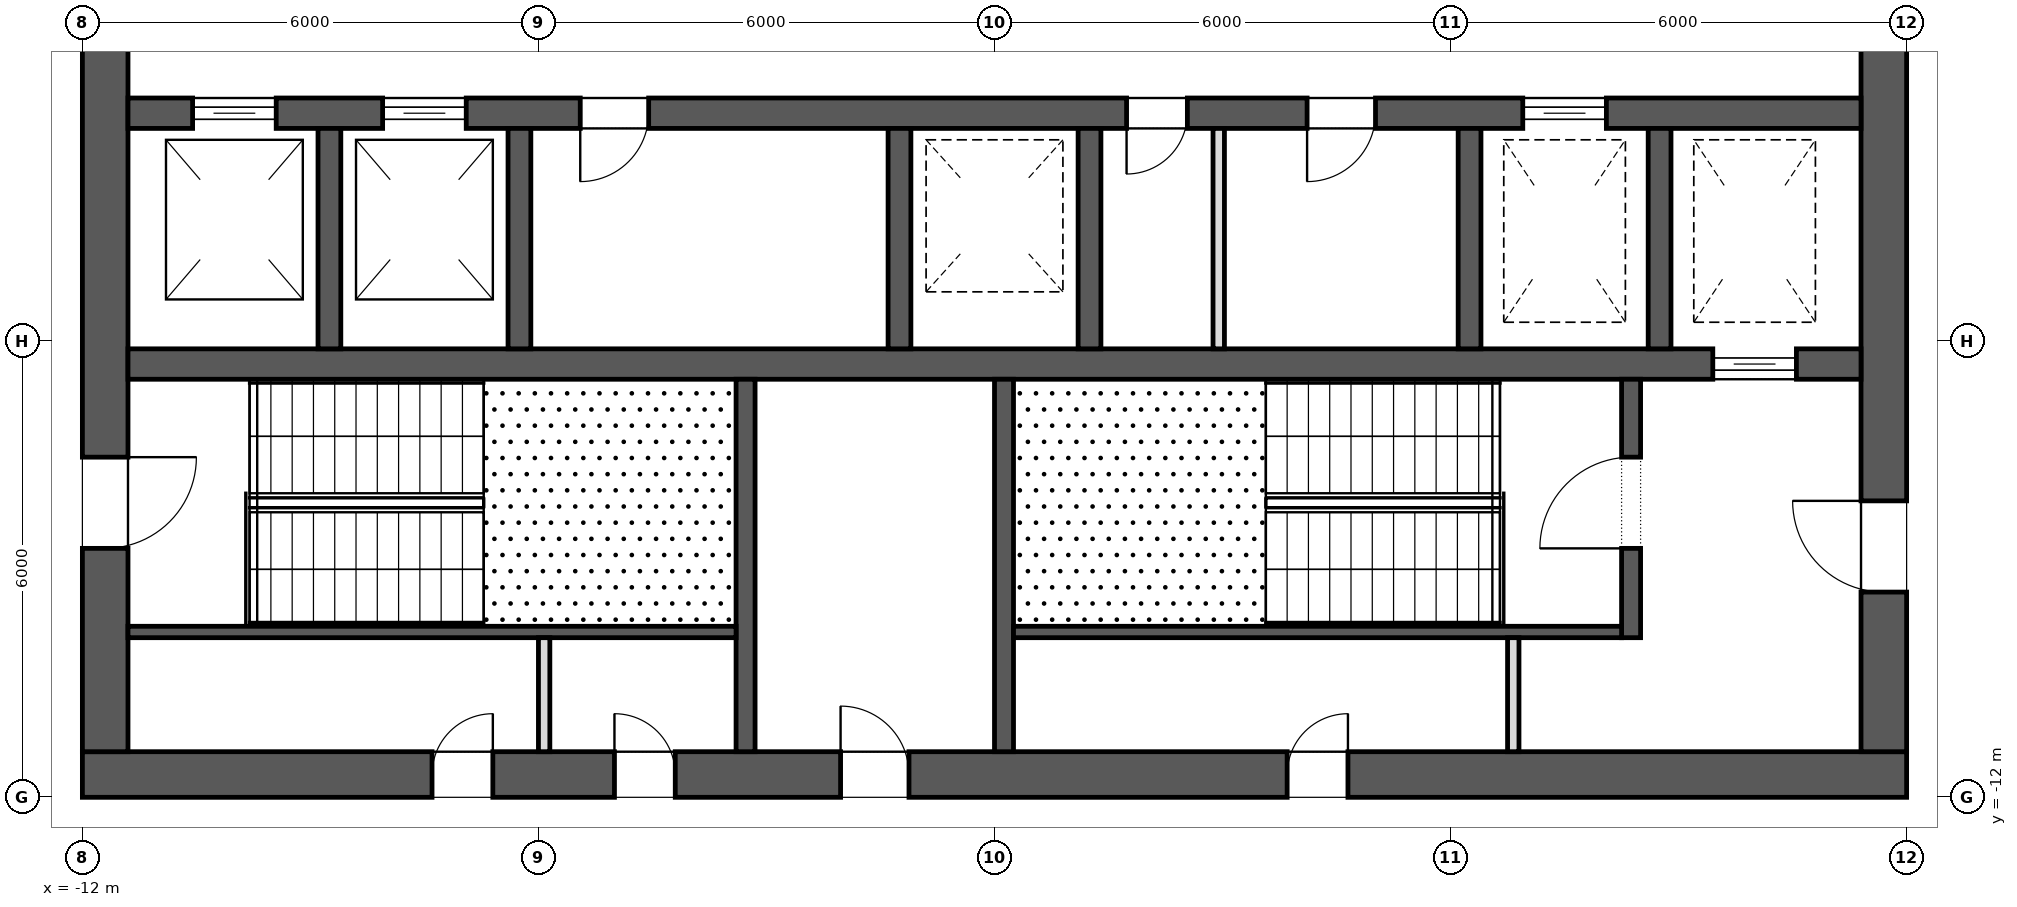
"""IFC4 building model, lengths in metres.
Left out: names, types, materials, properties, quantities, classifications, styles, units other than length and angle.
Written with IfcOpenShell. Run it as: python <this file> out.ifc"""

import sys

from ifc_helpers import new_model, si_unit, direction, frame, frame_2d, origin, place, context, subcontext, project, spatial, rectangle, extrude, element, fill, save


model = new_model("IFC4")
c1 = context("Model", 3, precision=1e-05, world=origin(), true_north=direction((0.0, 1.0)))
c2 = subcontext(c1, "Body", "Model", "MODEL_VIEW")
j1 = project(units=[si_unit("LENGTHUNIT", "METRE"), si_unit("PLANEANGLEUNIT", "RADIAN")], contexts=[c1])
p1 = place(None, origin())
s1 = spatial("IfcSite", under=j1, at=p1, CompositionType="ELEMENT")
p2 = place(p1, origin())
s2 = spatial("IfcBuilding", under=s1, at=p2, CompositionType="ELEMENT")
p3 = place(p2, frame((0.0, 0.0, 268.3)))
s3 = spatial("IfcBuildingStorey", under=s2, at=p3, CompositionType="ELEMENT", Elevation=268.3)
p4 = place(p3, frame((-12.0, -11.7, 0.0), z_axis=(0.0, 0.0, 1.0), x_axis=(1.0, 0.0, 0.0)))
e1 = element("IfcWall", 1, at=p4, inside=s3, PredefinedType="SHEAR", context=c2, shape_type="SweptSolid", body=[
    extrude(rectangle(XDim=24.0, YDim=0.6, at=frame_2d((12.0, 0.0))), origin(), (0.0, 0.0, 1.0), 4.0),
])
p5 = place(p4, frame((9.975, 0.0, 0.0)))
e2 = element("IfcOpeningElement", 2, at=p5, cuts=e1, PredefinedType="OPENING", context=c2, shape_type="SweptSolid", body=[
    extrude(rectangle(XDim=0.9, YDim=2.1, at=frame_2d((0.45, 1.05))), frame((0.0, 0.312, 0.0), z_axis=(0.0, -1.0, 0.0), x_axis=(1.0, 0.0, 0.0)), (0.0, 0.0, 1.0), 0.624),
])
p6 = place(p4, frame((4.6, 0.0, 0.0)))
e3 = element("IfcOpeningElement", 3, at=p6, cuts=e1, PredefinedType="OPENING", context=c2, shape_type="SweptSolid", body=[
    extrude(rectangle(XDim=0.8, YDim=2.1, at=frame_2d((0.4, 1.05))), frame((0.0, 0.312, 0.0), z_axis=(0.0, -1.0, 0.0), x_axis=(1.0, 0.0, 0.0)), (0.0, 0.0, 1.0), 0.624),
])
p7 = place(p4, frame((7.0, 0.0, 0.0)))
e4 = element("IfcOpeningElement", 4, at=p7, cuts=e1, PredefinedType="OPENING", context=c2, shape_type="SweptSolid", body=[
    extrude(rectangle(XDim=0.8, YDim=2.1, at=frame_2d((0.4, 1.05))), frame((0.0, 0.312, 0.0), z_axis=(0.0, -1.0, 0.0), x_axis=(1.0, 0.0, 0.0)), (0.0, 0.0, 1.0), 0.624),
])
p8 = place(p4, frame((15.85, 0.0, 0.0)))
e5 = element("IfcOpeningElement", 5, at=p8, cuts=e1, PredefinedType="OPENING", context=c2, shape_type="SweptSolid", body=[
    extrude(rectangle(XDim=0.8, YDim=2.1, at=frame_2d((0.4, 1.05))), frame((0.0, 0.312, 0.0), z_axis=(0.0, -1.0, 0.0), x_axis=(1.0, 0.0, 0.0)), (0.0, 0.0, 1.0), 0.624),
])
p9 = place(p3, frame((11.7, -11.4, 0.0), z_axis=(0.0, 0.0, 1.0), x_axis=(0.0, 1.0, 0.0)))
e6 = element("IfcWall", 6, at=p9, inside=s3, PredefinedType="SHEAR", context=c2, shape_type="SweptSolid", body=[
    extrude(rectangle(XDim=22.8, YDim=0.6, at=frame_2d((11.4, 0.0))), origin(), (0.0, 0.0, 1.0), 4.0),
])
p10 = place(p9, frame((10.2, 0.0, 0.0)))
e7 = element("IfcOpeningElement", 7, at=p10, cuts=e6, PredefinedType="OPENING", context=c2, shape_type="SweptSolid", body=[
    extrude(rectangle(XDim=2.4, YDim=2.1, at=frame_2d((1.2, 1.05))), frame((0.0, 0.312, 0.0), z_axis=(0.0, -1.0, 0.0), x_axis=(1.0, 0.0, 0.0)), (0.0, 0.0, 1.0), 0.624),
])
p11 = place(p9, frame((19.5, 0.0, 0.0)))
e8 = element("IfcOpeningElement", 8, at=p11, cuts=e6, PredefinedType="OPENING", context=c2, shape_type="SweptSolid", body=[
    extrude(rectangle(XDim=1.2, YDim=2.1, at=frame_2d((0.6, 1.05))), frame((0.0, 0.312, 0.0), z_axis=(0.0, -1.0, 0.0), x_axis=(1.0, 0.0, 0.0)), (0.0, 0.0, 1.0), 0.624),
])
p12 = place(p9, frame((2.1, 0.0, 0.0)))
e9 = element("IfcOpeningElement", 9, at=p12, cuts=e6, PredefinedType="OPENING", context=c2, shape_type="SweptSolid", body=[
    extrude(rectangle(XDim=1.2, YDim=2.1, at=frame_2d((0.6, 1.05))), frame((0.0, 0.312, 0.0), z_axis=(0.0, -1.0, 0.0), x_axis=(1.0, 0.0, 0.0)), (0.0, 0.0, 1.0), 0.624),
])
p13 = place(p3, frame((-11.7, -11.4, 0.0), z_axis=(0.0, 0.0, 1.0), x_axis=(0.0, 1.0, 0.0)))
e10 = element("IfcWall", 10, at=p13, inside=s3, PredefinedType="SHEAR", context=c2, shape_type="SweptSolid", body=[
    extrude(rectangle(XDim=22.8, YDim=0.6, at=frame_2d((11.4, 0.0))), origin(), (0.0, 0.0, 1.0), 4.0),
])
p14 = place(p13, frame((10.2, 0.0, 0.0)))
e11 = element("IfcOpeningElement", 11, at=p14, cuts=e10, PredefinedType="OPENING", context=c2, shape_type="SweptSolid", body=[
    extrude(rectangle(XDim=2.4, YDim=2.1, at=frame_2d((1.2, 1.05))), frame((0.0, 0.312, 0.0), z_axis=(0.0, -1.0, 0.0), x_axis=(1.0, 0.0, 0.0)), (0.0, 0.0, 1.0), 0.624),
])
p15 = place(p13, frame((18.925, 0.0, 0.0)))
e12 = element("IfcOpeningElement", 12, at=p15, cuts=e10, PredefinedType="OPENING", context=c2, shape_type="SweptSolid", body=[
    extrude(rectangle(XDim=1.2, YDim=2.1, at=frame_2d((0.6, 1.05))), frame((0.0, 0.312, 0.0), z_axis=(0.0, -1.0, 0.0), x_axis=(1.0, 0.0, 0.0)), (0.0, 0.0, 1.0), 0.624),
])
p16 = place(p13, frame((2.675, 0.0, 0.0)))
e13 = element("IfcOpeningElement", 13, at=p16, cuts=e10, PredefinedType="OPENING", context=c2, shape_type="SweptSolid", body=[
    extrude(rectangle(XDim=1.2, YDim=2.1, at=frame_2d((0.6, 1.05))), frame((0.0, 0.312, 0.0), z_axis=(0.0, -1.0, 0.0), x_axis=(1.0, 0.0, 0.0)), (0.0, 0.0, 1.0), 0.624),
])
p17 = place(p3, frame((-11.4, -3.0, 0.0), z_axis=(0.0, 0.0, 1.0), x_axis=(1.0, 0.0, 0.0)))
e14 = element("IfcWall", 14, at=p17, inside=s3, PredefinedType="SHEAR", context=c2, shape_type="SweptSolid", body=[
    extrude(rectangle(XDim=22.8, YDim=0.4, at=frame_2d((11.4, 0.0))), origin(), (0.0, 0.0, 1.0), 4.0),
])
p18 = place(p17, frame((0.85, 0.0, 0.0)))
e15 = element("IfcOpeningElement", 15, at=p18, cuts=e14, PredefinedType="OPENING", context=c2, shape_type="SweptSolid", body=[
    extrude(rectangle(XDim=1.1, YDim=2.1, at=frame_2d((0.55, 1.05))), frame((0.0, 0.212, 0.0), z_axis=(0.0, -1.0, 0.0), x_axis=(1.0, 0.0, 0.0)), (0.0, 0.0, 1.0), 0.424),
])
p19 = place(p17, frame((3.35, 0.0, 0.0)))
e16 = element("IfcOpeningElement", 16, at=p19, cuts=e14, PredefinedType="OPENING", context=c2, shape_type="SweptSolid", body=[
    extrude(rectangle(XDim=1.1, YDim=2.1, at=frame_2d((0.55, 1.05))), frame((0.0, 0.212, 0.0), z_axis=(0.0, -1.0, 0.0), x_axis=(1.0, 0.0, 0.0)), (0.0, 0.0, 1.0), 0.424),
])
p20 = place(p17, frame((18.35, 0.0, 0.0)))
e17 = element("IfcOpeningElement", 17, at=p20, cuts=e14, PredefinedType="OPENING", context=c2, shape_type="SweptSolid", body=[
    extrude(rectangle(XDim=1.1, YDim=2.1, at=frame_2d((0.55, 1.05))), frame((0.0, 0.212, 0.0), z_axis=(0.0, -1.0, 0.0), x_axis=(1.0, 0.0, 0.0)), (0.0, 0.0, 1.0), 0.424),
])
p21 = place(p17, frame((13.137, 0.0, 0.0)))
e18 = element("IfcOpeningElement", 18, at=p21, cuts=e14, PredefinedType="OPENING", context=c2, shape_type="SweptSolid", body=[
    extrude(rectangle(XDim=0.8, YDim=2.1, at=frame_2d((0.4, 1.05))), frame((0.0, 0.212, 0.0), z_axis=(0.0, -1.0, 0.0), x_axis=(1.0, 0.0, 0.0)), (0.0, 0.0, 1.0), 0.424),
])
p22 = place(p17, frame((15.512, 0.0, 0.0)))
e19 = element("IfcOpeningElement", 19, at=p22, cuts=e14, PredefinedType="OPENING", context=c2, shape_type="SweptSolid", body=[
    extrude(rectangle(XDim=0.9, YDim=2.1, at=frame_2d((0.45, 1.05))), frame((0.0, 0.212, 0.0), z_axis=(0.0, -1.0, 0.0), x_axis=(1.0, 0.0, 0.0)), (0.0, 0.0, 1.0), 0.424),
])
p23 = place(p17, frame((5.95, 0.0, 0.0)))
e20 = element("IfcOpeningElement", 20, at=p23, cuts=e14, PredefinedType="OPENING", context=c2, shape_type="SweptSolid", body=[
    extrude(rectangle(XDim=0.9, YDim=2.1, at=frame_2d((0.45, 1.05))), frame((0.0, 0.212, 0.0), z_axis=(0.0, -1.0, 0.0), x_axis=(1.0, 0.0, 0.0)), (0.0, 0.0, 1.0), 0.424),
])
p24 = place(p3, frame((-11.4, -6.3, 0.0), z_axis=(0.0, 0.0, 1.0), x_axis=(1.0, 0.0, 0.0)))
e21 = element("IfcWall", 21, at=p24, inside=s3, PredefinedType="SHEAR", context=c2, shape_type="SweptSolid", body=[
    extrude(rectangle(XDim=22.8, YDim=0.4, at=frame_2d((11.4, 0.0))), origin(), (0.0, 0.0, 1.0), 4.0),
])
p25 = place(p24, frame((20.85, 0.0, 0.0)))
e22 = element("IfcOpeningElement", 22, at=p25, cuts=e21, PredefinedType="OPENING", context=c2, shape_type="SweptSolid", body=[
    extrude(rectangle(XDim=1.1, YDim=2.1, at=frame_2d((0.55, 1.05))), frame((0.0, 0.212, 0.0), z_axis=(0.0, -1.0, 0.0), x_axis=(1.0, 0.0, 0.0)), (0.0, 0.0, 1.0), 0.424),
])
for number, where, z_axis, x_axis in (
    (23, (-8.75, -6.1, 0.0), (0.0, 0.0, 1.0), (0.0, 1.0, 0.0)),
    (24, (-6.25, -6.1, 0.0), (0.0, 0.0, 1.0), (0.0, 1.0, 0.0)),
    (25, (-1.25, -6.1, 0.0), (0.0, 0.0, 1.0), (0.0, 1.0, 0.0)),
    (26, (1.25, -6.1, 0.0), (0.0, 0.0, 1.0), (0.0, 1.0, 0.0)),
    (27, (6.25, -6.1, 0.0), (0.0, 0.0, 1.0), (0.0, 1.0, 0.0)),
    (28, (8.75, -6.1, 0.0), (0.0, 0.0, 1.0), (0.0, 1.0, 0.0)),
):
    element("IfcWall", number, at=place(p3, frame(where, z_axis=z_axis, x_axis=x_axis)), inside=s3, PredefinedType="SHEAR", context=c2, shape_type="SweptSolid", body=[
        extrude(rectangle(XDim=2.9, YDim=0.3, at=frame_2d((1.45, 0.0))), origin(), (0.0, 0.0, 1.0), 4.0),
    ])
for number, where, z_axis, x_axis in (
    (29, (-3.275, -11.4, 0.0), (0.0, 0.0, 1.0), (0.0, 1.0, 0.0)),
    (30, (0.125, -11.4, 0.0), (0.0, 0.0, 1.0), (0.0, 1.0, 0.0)),
):
    element("IfcWall", number, at=place(p3, frame(where, z_axis=z_axis, x_axis=x_axis)), inside=s3, PredefinedType="SHEAR", context=c2, shape_type="SweptSolid", body=[
        extrude(rectangle(XDim=4.9, YDim=0.25, at=frame_2d((2.45, 0.0))), origin(), (0.0, 0.0, 1.0), 3.7),
    ])
p26 = place(p3, frame((8.375, -9.9, 0.0), z_axis=(0.0, 0.0, 1.0), x_axis=(0.0, 1.0, 0.0)))
e31 = element("IfcWall", 31, at=p26, inside=s3, PredefinedType="SHEAR", context=c2, shape_type="SweptSolid", body=[
    extrude(rectangle(XDim=3.4, YDim=0.25, at=frame_2d((1.7, 0.0))), origin(), (0.0, 0.0, 1.0), 3.7),
])
p27 = place(p26, frame((1.175, 0.0, 0.0)))
e32 = element("IfcOpeningElement", 32, at=p27, cuts=e31, PredefinedType="OPENING", context=c2, shape_type="SweptSolid", body=[
    extrude(rectangle(XDim=1.2, YDim=2.1, at=frame_2d((0.6, 1.05))), frame((0.0, 0.137, 0.0), z_axis=(0.0, -1.0, 0.0), x_axis=(1.0, 0.0, 0.0)), (0.0, 0.0, 1.0), 0.274),
])
for number, where, z_axis, x_axis in (
    (33, (-11.4, -9.825, 0.0), (0.0, 0.0, 1.0), (1.0, 0.0, 0.0)),
    (34, (0.25, -9.825, 0.0), (0.0, 0.0, 1.0), (1.0, 0.0, 0.0)),
):
    element("IfcWall", number, at=place(p3, frame(where, z_axis=z_axis, x_axis=x_axis)), inside=s3, PredefinedType="SHEAR", context=c2, shape_type="SweptSolid", body=[
        extrude(rectangle(XDim=8.0, YDim=0.15, at=frame_2d((4.0, 0.0))), origin(), (0.0, 0.0, 1.0), 3.7),
    ])
for number, where, z_axis, x_axis in (
    (35, (-5.925, -11.4, 0.0), (0.0, 0.0, 1.0), (0.0, 1.0, 0.0)),
    (36, (6.825, -11.4, 0.0), (0.0, 0.0, 1.0), (0.0, 1.0, 0.0)),
):
    element("IfcWall", number, at=place(p3, frame(where, z_axis=z_axis, x_axis=x_axis)), inside=s3, PredefinedType="PARTITIONING", context=c2, shape_type="SweptSolid", body=[
        extrude(rectangle(XDim=1.5, YDim=0.15, at=frame_2d((0.75, 0.0))), origin(), (0.0, 0.0, 1.0), 3.7),
    ])
p28 = place(p3, frame((2.95, -6.1, 0.0), z_axis=(0.0, 0.0, 1.0), x_axis=(0.0, 1.0, 0.0)))
e37 = element("IfcWall", 37, at=p28, inside=s3, PredefinedType="PARTITIONING", context=c2, shape_type="SweptSolid", body=[
    extrude(rectangle(XDim=2.9, YDim=0.15, at=frame_2d((1.45, 0.0))), origin(), (0.0, 0.0, 1.0), 3.7),
])
p29 = place(p25, origin())
e38 = element("IfcDoor", 38, at=p29, inside=s3, OperationType="SLIDING_TO_LEFT", PredefinedType="DOOR", context=c2, shape_type="SweptSolid", body=[
    extrude(rectangle(XDim=1.1, YDim=2.1, at=frame_2d((0.55, 1.05))), frame((0.0, 0.025, 0.0), z_axis=(0.0, -1.0, 0.0), x_axis=(1.0, 0.0, 0.0)), (0.0, 0.0, 1.0), 0.05),
])
fill(e22, e38)
p30 = place(p18, origin())
e39 = element("IfcDoor", 39, at=p30, inside=s3, OperationType="SLIDING_TO_LEFT", PredefinedType="DOOR", context=c2, shape_type="SweptSolid", body=[
    extrude(rectangle(XDim=1.1, YDim=2.1, at=frame_2d((0.55, 1.05))), frame((0.0, 0.025, 0.0), z_axis=(0.0, -1.0, 0.0), x_axis=(1.0, 0.0, 0.0)), (0.0, 0.0, 1.0), 0.05),
])
fill(e15, e39)
p31 = place(p19, origin())
e40 = element("IfcDoor", 40, at=p31, inside=s3, OperationType="SLIDING_TO_LEFT", PredefinedType="DOOR", context=c2, shape_type="SweptSolid", body=[
    extrude(rectangle(XDim=1.1, YDim=2.1, at=frame_2d((0.55, 1.05))), frame((0.0, 0.025, 0.0), z_axis=(0.0, -1.0, 0.0), x_axis=(1.0, 0.0, 0.0)), (0.0, 0.0, 1.0), 0.05),
])
fill(e16, e40)
p32 = place(p20, origin())
e41 = element("IfcDoor", 41, at=p32, inside=s3, OperationType="SLIDING_TO_LEFT", PredefinedType="DOOR", context=c2, shape_type="SweptSolid", body=[
    extrude(rectangle(XDim=1.1, YDim=2.1, at=frame_2d((0.55, 1.05))), frame((0.0, 0.025, 0.0), z_axis=(0.0, -1.0, 0.0), x_axis=(1.0, 0.0, 0.0)), (0.0, 0.0, 1.0), 0.05),
])
fill(e17, e41)
p33 = place(p16, frame((1.2, 0.0, 0.0), z_axis=(0.0, 0.0, 1.0), x_axis=(-1.0, 0.0, 0.0)))
e42 = element("IfcDoor", 42, at=p33, inside=s3, OperationType="SINGLE_SWING_RIGHT", PredefinedType="DOOR", context=c2, shape_type="SweptSolid", body=[
    extrude(rectangle(XDim=1.2, YDim=2.1, at=frame_2d((0.6, 1.05))), frame((0.0, 0.025, 0.0), z_axis=(0.0, -1.0, 0.0), x_axis=(1.0, 0.0, 0.0)), (0.0, 0.0, 1.0), 0.05),
])
fill(e13, e42)
p34 = place(p27, origin())
e43 = element("IfcDoor", 43, at=p34, inside=s3, OperationType="SINGLE_SWING_RIGHT", PredefinedType="DOOR", context=c2, shape_type="SweptSolid", body=[
    extrude(rectangle(XDim=1.2, YDim=2.1, at=frame_2d((0.6, 1.05))), frame((0.0, 0.025, 0.0), z_axis=(0.0, -1.0, 0.0), x_axis=(1.0, 0.0, 0.0)), (0.0, 0.0, 1.0), 0.05),
])
fill(e32, e43)
p35 = place(p12, origin())
e44 = element("IfcDoor", 44, at=p35, inside=s3, OperationType="SINGLE_SWING_LEFT", PredefinedType="DOOR", context=c2, shape_type="SweptSolid", body=[
    extrude(rectangle(XDim=1.2, YDim=2.1, at=frame_2d((0.6, 1.05))), frame((0.0, 0.025, 0.0), z_axis=(0.0, -1.0, 0.0), x_axis=(1.0, 0.0, 0.0)), (0.0, 0.0, 1.0), 0.05),
])
fill(e9, e44)
p36 = place(p5, origin())
e45 = element("IfcDoor", 45, at=p36, inside=s3, OperationType="SINGLE_SWING_RIGHT", PredefinedType="DOOR", context=c2, shape_type="SweptSolid", body=[
    extrude(rectangle(XDim=0.9, YDim=2.1, at=frame_2d((0.45, 1.05))), frame((0.0, 0.025, 0.0), z_axis=(0.0, -1.0, 0.0), x_axis=(1.0, 0.0, 0.0)), (0.0, 0.0, 1.0), 0.05),
])
fill(e2, e45)
p37 = place(p6, origin())
e46 = element("IfcDoor", 46, at=p37, inside=s3, OperationType="SINGLE_SWING_LEFT", PredefinedType="DOOR", context=c2, shape_type="SweptSolid", body=[
    extrude(rectangle(XDim=0.8, YDim=2.1, at=frame_2d((0.4, 1.05))), frame((0.0, 0.025, 0.0), z_axis=(0.0, -1.0, 0.0), x_axis=(1.0, 0.0, 0.0)), (0.0, 0.0, 1.0), 0.05),
])
fill(e3, e46)
p38 = place(p7, origin())
e47 = element("IfcDoor", 47, at=p38, inside=s3, OperationType="SINGLE_SWING_RIGHT", PredefinedType="DOOR", context=c2, shape_type="SweptSolid", body=[
    extrude(rectangle(XDim=0.8, YDim=2.1, at=frame_2d((0.4, 1.05))), frame((0.0, 0.025, 0.0), z_axis=(0.0, -1.0, 0.0), x_axis=(1.0, 0.0, 0.0)), (0.0, 0.0, 1.0), 0.05),
])
fill(e4, e47)
p39 = place(p8, origin())
e48 = element("IfcDoor", 48, at=p39, inside=s3, OperationType="SINGLE_SWING_LEFT", PredefinedType="DOOR", context=c2, shape_type="SweptSolid", body=[
    extrude(rectangle(XDim=0.8, YDim=2.1, at=frame_2d((0.4, 1.05))), frame((0.0, 0.025, 0.0), z_axis=(0.0, -1.0, 0.0), x_axis=(1.0, 0.0, 0.0)), (0.0, 0.0, 1.0), 0.05),
])
fill(e5, e48)
p40 = place(p21, frame((0.8, 0.0, 0.0), z_axis=(0.0, 0.0, 1.0), x_axis=(-1.0, 0.0, 0.0)))
e49 = element("IfcDoor", 49, at=p40, inside=s3, OperationType="SINGLE_SWING_LEFT", PredefinedType="DOOR", context=c2, shape_type="SweptSolid", body=[
    extrude(rectangle(XDim=0.8, YDim=2.1, at=frame_2d((0.4, 1.05))), frame((0.0, 0.025, 0.0), z_axis=(0.0, -1.0, 0.0), x_axis=(1.0, 0.0, 0.0)), (0.0, 0.0, 1.0), 0.05),
])
fill(e18, e49)
p41 = place(p22, frame((0.9, 0.0, 0.0), z_axis=(0.0, 0.0, 1.0), x_axis=(-1.0, 0.0, 0.0)))
e50 = element("IfcDoor", 50, at=p41, inside=s3, OperationType="SINGLE_SWING_LEFT", PredefinedType="DOOR", context=c2, shape_type="SweptSolid", body=[
    extrude(rectangle(XDim=0.9, YDim=2.1, at=frame_2d((0.45, 1.05))), frame((0.0, 0.025, 0.0), z_axis=(0.0, -1.0, 0.0), x_axis=(1.0, 0.0, 0.0)), (0.0, 0.0, 1.0), 0.05),
])
fill(e19, e50)
p42 = place(p23, frame((0.9, 0.0, 0.0), z_axis=(0.0, 0.0, 1.0), x_axis=(-1.0, 0.0, 0.0)))
e51 = element("IfcDoor", 51, at=p42, inside=s3, OperationType="SINGLE_SWING_LEFT", PredefinedType="DOOR", context=c2, shape_type="SweptSolid", body=[
    extrude(rectangle(XDim=0.9, YDim=2.1, at=frame_2d((0.45, 1.05))), frame((0.0, 0.025, 0.0), z_axis=(0.0, -1.0, 0.0), x_axis=(1.0, 0.0, 0.0)), (0.0, 0.0, 1.0), 0.05),
])
fill(e20, e51)
save(model, sys.argv[1])
